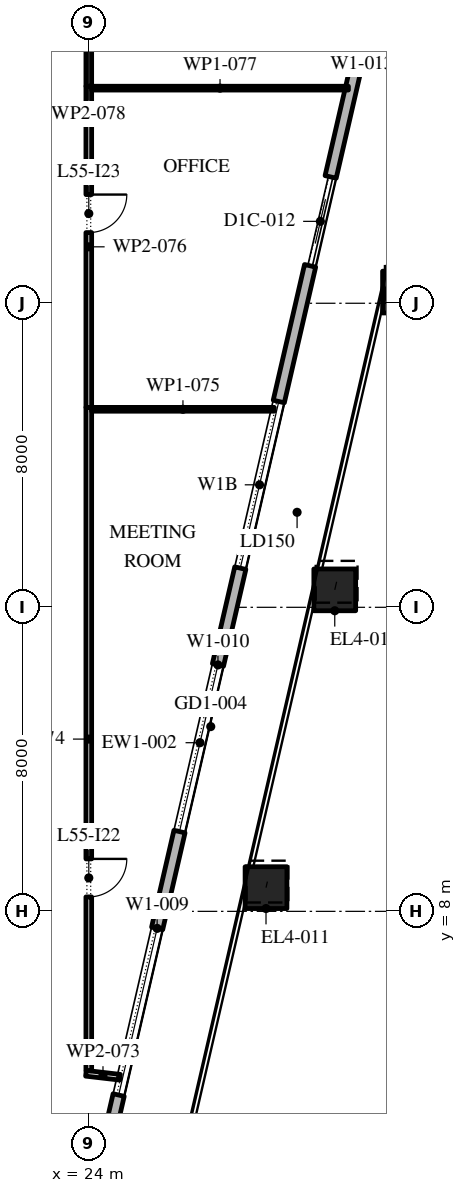
"""IFC4 building model, lengths in metres.
Left out: names, types, materials, properties, quantities, classifications, styles, units other than length and angle.
Written with IfcOpenShell. Run it as: python <this file> out.ifc"""

import sys

from ifc_helpers import new_model, si_unit, direction, frame, frame_2d, origin, origin_2d, place, context, subcontext, project, spatial, rectangle, extrude, element, fill, save


model = new_model("IFC4")
c1 = context("Model", 3, precision=1e-05, world=origin(), true_north=direction((0.0, 1.0)))
c2 = subcontext(c1, "Body", "Model", "MODEL_VIEW")
j1 = project(units=[si_unit("LENGTHUNIT", "METRE"), si_unit("PLANEANGLEUNIT", "RADIAN")], contexts=[c1])
p1 = place(None, origin())
s1 = spatial("IfcSite", under=j1, at=p1, CompositionType="ELEMENT")
p2 = place(p1, origin())
s2 = spatial("IfcBuilding", under=s1, at=p2, CompositionType="ELEMENT")
p3 = place(p2, frame((0.0, 0.0, 255.6)))
s3 = spatial("IfcBuildingStorey", under=s2, at=p3, CompositionType="ELEMENT", Elevation=255.6)
p4 = place(p3, frame((28.663, 8.624, 0.0), z_axis=(0.00871280379, 0.037929739166, 0.999242424008), x_axis=(-0.974617095667, 0.223878352757, 0.0)))
e1 = element("IfcColumn", 1, at=p4, inside=s3, PredefinedType="COLUMN", context=c2, shape_type="SweptSolid", body=[
    extrude(rectangle(XDim=1.1, YDim=1.1, at=origin_2d()), origin(), (0.0, 0.0, 1.0), 4.203),
])
p5 = place(p3, frame((30.472, 16.459, 0.0), z_axis=(0.011668267153, 0.050562490995, 0.998652735462), x_axis=(-0.974391195695, 0.224859506699, 0.0)))
e2 = element("IfcColumn", 2, at=p5, inside=s3, PredefinedType="COLUMN", context=c2, shape_type="SweptSolid", body=[
    extrude(rectangle(XDim=1.1, YDim=1.1, at=origin_2d()), origin(), (0.0, 0.0, 1.0), 4.206),
])
p6 = place(p3, frame((32.281, 24.295, 0.0), z_axis=(0.014559841898, 0.063111984005, 0.997900239743), x_axis=(-0.97440628778, 0.224794097641, 0.0)))
e3 = element("IfcColumn", 3, at=p6, inside=s3, PredefinedType="COLUMN", context=c2, shape_type="SweptSolid", body=[
    extrude(rectangle(XDim=1.1, YDim=1.1, at=origin_2d()), origin(), (0.0, 0.0, 1.0), 4.209),
])
p7 = place(p3, frame((21.359, -11.678, 0.0), z_axis=(0.0, 0.0, 1.0), x_axis=(0.224949198343, 0.974370493275, 0.0)))
e4 = element("IfcWall", 4, at=p7, inside=s3, PredefinedType="STANDARD", context=c2, shape_type="SweptSolid", body=[
    extrude(rectangle(XDim=49.5, YDim=0.3, at=frame_2d((24.75, 0.0))), origin(), (0.0, 0.0, 1.0), 4.0),
])
p8 = place(p7, frame((1.157, 0.0, 0.45)))
e5 = element("IfcOpeningElement", 5, at=p8, cuts=e4, PredefinedType="OPENING", context=c2, shape_type="SweptSolid", body=[
    extrude(rectangle(XDim=4.5, YDim=3.05, at=frame_2d((2.25, 1.525))), frame((0.0, 0.16, 0.0), z_axis=(0.0, -1.0, 0.0), x_axis=(1.0, 0.0, 0.0)), (0.0, 0.0, 1.0), 0.32),
])
p9 = place(p7, frame((8.121, 0.0, 0.45)))
e6 = element("IfcOpeningElement", 6, at=p9, cuts=e4, PredefinedType="OPENING", context=c2, shape_type="SweptSolid", body=[
    extrude(rectangle(XDim=4.5, YDim=3.05, at=frame_2d((2.25, 1.525))), frame((0.0, 0.16, 0.0), z_axis=(0.0, -1.0, 0.0), x_axis=(1.0, 0.0, 0.0)), (0.0, 0.0, 1.0), 0.32),
])
p10 = place(p7, frame((15.236, 0.0, 0.45)))
e7 = element("IfcOpeningElement", 7, at=p10, cuts=e4, PredefinedType="OPENING", context=c2, shape_type="SweptSolid", body=[
    extrude(rectangle(XDim=4.5, YDim=3.05, at=frame_2d((2.25, 1.525))), frame((0.0, 0.16, 0.0), z_axis=(0.0, -1.0, 0.0), x_axis=(1.0, 0.0, 0.0)), (0.0, 0.0, 1.0), 0.32),
])
p11 = place(p7, frame((22.35, 0.0, 0.45)))
e8 = element("IfcOpeningElement", 8, at=p11, cuts=e4, PredefinedType="OPENING", context=c2, shape_type="SweptSolid", body=[
    extrude(rectangle(XDim=4.5, YDim=3.05, at=frame_2d((2.25, 1.525))), frame((0.0, 0.16, 0.0), z_axis=(0.0, -1.0, 0.0), x_axis=(1.0, 0.0, 0.0)), (0.0, 0.0, 1.0), 0.32),
])
p12 = place(p7, frame((29.464, 0.0, 0.45)))
e9 = element("IfcOpeningElement", 9, at=p12, cuts=e4, PredefinedType="OPENING", context=c2, shape_type="SweptSolid", body=[
    extrude(rectangle(XDim=4.5, YDim=2.95, at=frame_2d((2.25, 1.475))), frame((0.0, 0.16, 0.0), z_axis=(0.0, -1.0, 0.0), x_axis=(1.0, 0.0, 0.0)), (0.0, 0.0, 1.0), 0.32),
])
p13 = place(p7, frame((37.628, 0.0, 0.0)))
e10 = element("IfcOpeningElement", 10, at=p13, cuts=e4, PredefinedType="OPENING", context=c2, shape_type="SweptSolid", body=[
    extrude(rectangle(XDim=2.4, YDim=3.325, at=frame_2d((1.2, 1.663))), frame((0.0, 0.16, 0.0), z_axis=(0.0, -1.0, 0.0), x_axis=(1.0, 0.0, 0.0)), (0.0, 0.0, 1.0), 0.32),
])
p14 = place(p7, frame((43.693, 0.0, 0.45)))
e11 = element("IfcOpeningElement", 11, at=p14, cuts=e4, PredefinedType="OPENING", context=c2, shape_type="SweptSolid", body=[
    extrude(rectangle(XDim=4.5, YDim=3.05, at=frame_2d((2.25, 1.525))), frame((0.0, 0.16, 0.0), z_axis=(0.0, -1.0, 0.0), x_axis=(1.0, 0.0, 0.0)), (0.0, 0.0, 1.0), 0.32),
])
p15 = place(p3, frame((23.925, 3.739, 0.0), z_axis=(0.0, 0.0, 1.0), x_axis=(0.993344839434, -0.115178253021, 0.0)))
e12 = element("IfcWall", 12, at=p15, inside=s3, PredefinedType="PARTITIONING", context=c2, shape_type="SweptSolid", body=[
    extrude(rectangle(XDim=0.903, YDim=0.15, at=frame_2d((0.452, 0.0))), origin(), (0.0, 0.0, 1.0), 4.0),
])
p16 = place(p3, frame((24.0, 21.26, 0.0), z_axis=(0.0, 0.0, 1.0), x_axis=(0.0, -1.0, 0.0)))
e13 = element("IfcWall", 13, at=p16, inside=s3, PredefinedType="PARTITIONING", context=c2, shape_type="SweptSolid", body=[
    extrude(rectangle(XDim=17.455, YDim=0.15, at=frame_2d((8.728, 0.0))), origin(), (0.0, 0.0, 1.0), 4.0),
])
p17 = place(p16, frame((11.88, 0.0, 0.0)))
e14 = element("IfcOpeningElement", 14, at=p17, cuts=e13, PredefinedType="OPENING", context=c2, shape_type="SweptSolid", body=[
    extrude(rectangle(XDim=1.0, YDim=2.1, at=frame_2d((0.5, 1.05))), frame((0.0, 0.085, 0.0), z_axis=(0.0, -1.0, 0.0), x_axis=(1.0, 0.0, 0.0)), (0.0, 0.0, 1.0), 0.17),
])
p18 = place(p3, frame((24.075, 21.21, 0.0), z_axis=(0.0, 0.0, 1.0), x_axis=(1.0, 0.0, 0.0)))
e15 = element("IfcWall", 15, at=p18, inside=s3, PredefinedType="PARTITIONING", context=c2, shape_type="SweptSolid", body=[
    extrude(rectangle(XDim=4.805, YDim=0.1, at=frame_2d((2.402, 0.0))), origin(), (0.0, 0.0, 1.0), 4.0),
])
p19 = place(p3, frame((24.0, 29.71, 0.0), z_axis=(0.0, 0.0, 1.0), x_axis=(0.0, -1.0, 0.0)))
e16 = element("IfcWall", 16, at=p19, inside=s3, PredefinedType="PARTITIONING", context=c2, shape_type="SweptSolid", body=[
    extrude(rectangle(XDim=8.45, YDim=0.15, at=frame_2d((4.225, 0.0))), origin(), (0.0, 0.0, 1.0), 4.0),
])
p20 = place(p19, frame((2.85, 0.0, 0.0)))
e17 = element("IfcOpeningElement", 17, at=p20, cuts=e16, PredefinedType="OPENING", context=c2, shape_type="SweptSolid", body=[
    extrude(rectangle(XDim=1.0, YDim=2.1, at=frame_2d((0.5, 1.05))), frame((0.0, 0.085, 0.0), z_axis=(0.0, -1.0, 0.0), x_axis=(1.0, 0.0, 0.0)), (0.0, 0.0, 1.0), 0.17),
])
p21 = place(p3, frame((24.075, 29.66, 0.0), z_axis=(0.0, 0.0, 1.0), x_axis=(1.0, 0.0, 0.0)))
e18 = element("IfcWall", 18, at=p21, inside=s3, PredefinedType="PARTITIONING", context=c2, shape_type="SweptSolid", body=[
    extrude(rectangle(XDim=6.756, YDim=0.1, at=frame_2d((3.378, 0.0))), origin(), (0.0, 0.0, 1.0), 4.0),
])
p22 = place(p3, frame((24.0, 32.625, 0.0), z_axis=(0.0, 0.0, 1.0), x_axis=(0.0, -1.0, 0.0)))
e19 = element("IfcWall", 19, at=p22, inside=s3, PredefinedType="PARTITIONING", context=c2, shape_type="SweptSolid", body=[
    extrude(rectangle(XDim=2.915, YDim=0.15, at=frame_2d((1.458, 0.0))), origin(), (0.0, 0.0, 1.0), 4.0),
])
p23 = place(p22, frame((0.565, 0.0, 0.0)))
e20 = element("IfcOpeningElement", 20, at=p23, cuts=e19, PredefinedType="OPENING", context=c2, shape_type="SweptSolid", body=[
    extrude(rectangle(XDim=1.0, YDim=2.1, at=frame_2d((0.5, 1.05))), frame((0.0, 0.085, 0.0), z_axis=(0.0, -1.0, 0.0), x_axis=(1.0, 0.0, 0.0)), (0.0, 0.0, 1.0), 0.17),
])
p24 = place(p10, origin())
e21 = element("IfcWindow", 21, at=p24, inside=s3, PartitioningType="DOUBLE_PANEL_VERTICAL", PredefinedType="WINDOW", context=c2, shape_type="SweptSolid", body=[
    extrude(rectangle(XDim=4.5, YDim=3.05, at=frame_2d((2.25, 1.525))), frame((0.0, 0.03, 0.0), z_axis=(0.0, -1.0, 0.0), x_axis=(1.0, 0.0, 0.0)), (0.0, 0.0, 1.0), 0.06),
])
fill(e7, e21)
p25 = place(p11, origin())
e22 = element("IfcWindow", 22, at=p25, inside=s3, PartitioningType="DOUBLE_PANEL_VERTICAL", PredefinedType="WINDOW", context=c2, shape_type="SweptSolid", body=[
    extrude(rectangle(XDim=4.5, YDim=3.05, at=frame_2d((2.25, 1.525))), frame((0.0, 0.03, 0.0), z_axis=(0.0, -1.0, 0.0), x_axis=(1.0, 0.0, 0.0)), (0.0, 0.0, 1.0), 0.06),
])
fill(e8, e22)
p26 = place(p12, origin())
e23 = element("IfcWindow", 23, at=p26, inside=s3, PartitioningType="DOUBLE_PANEL_VERTICAL", PredefinedType="WINDOW", context=c2, shape_type="SweptSolid", body=[
    extrude(rectangle(XDim=4.5, YDim=2.95, at=frame_2d((2.25, 1.475))), frame((0.0, 0.03, 0.0), z_axis=(0.0, -1.0, 0.0), x_axis=(1.0, 0.0, 0.0)), (0.0, 0.0, 1.0), 0.06),
])
fill(e9, e23)
p27 = place(p13, origin())
e24 = element("IfcDoor", 24, at=p27, inside=s3, OperationType="DOUBLE_DOOR_SLIDING", PredefinedType="DOOR", context=c2, shape_type="SweptSolid", body=[
    extrude(rectangle(XDim=2.4, YDim=3.325, at=frame_2d((1.2, 1.663))), frame((0.0, 0.025, 0.0), z_axis=(0.0, -1.0, 0.0), x_axis=(1.0, 0.0, 0.0)), (0.0, 0.0, 1.0), 0.05),
])
fill(e10, e24)
p28 = place(p17, origin())
e25 = element("IfcDoor", 25, at=p28, inside=s3, OperationType="SINGLE_SWING_RIGHT", PredefinedType="DOOR", context=c2, shape_type="SweptSolid", body=[
    extrude(rectangle(XDim=1.0, YDim=2.1, at=frame_2d((0.5, 1.05))), frame((0.0, 0.025, 0.0), z_axis=(0.0, -1.0, 0.0), x_axis=(1.0, 0.0, 0.0)), (0.0, 0.0, 1.0), 0.05),
])
fill(e14, e25)
p29 = place(p20, origin())
e26 = element("IfcDoor", 26, at=p29, inside=s3, OperationType="SINGLE_SWING_RIGHT", PredefinedType="DOOR", context=c2, shape_type="SweptSolid", body=[
    extrude(rectangle(XDim=1.0, YDim=2.1, at=frame_2d((0.5, 1.05))), frame((0.0, 0.025, 0.0), z_axis=(0.0, -1.0, 0.0), x_axis=(1.0, 0.0, 0.0)), (0.0, 0.0, 1.0), 0.05),
])
fill(e17, e26)
save(model, sys.argv[1])
